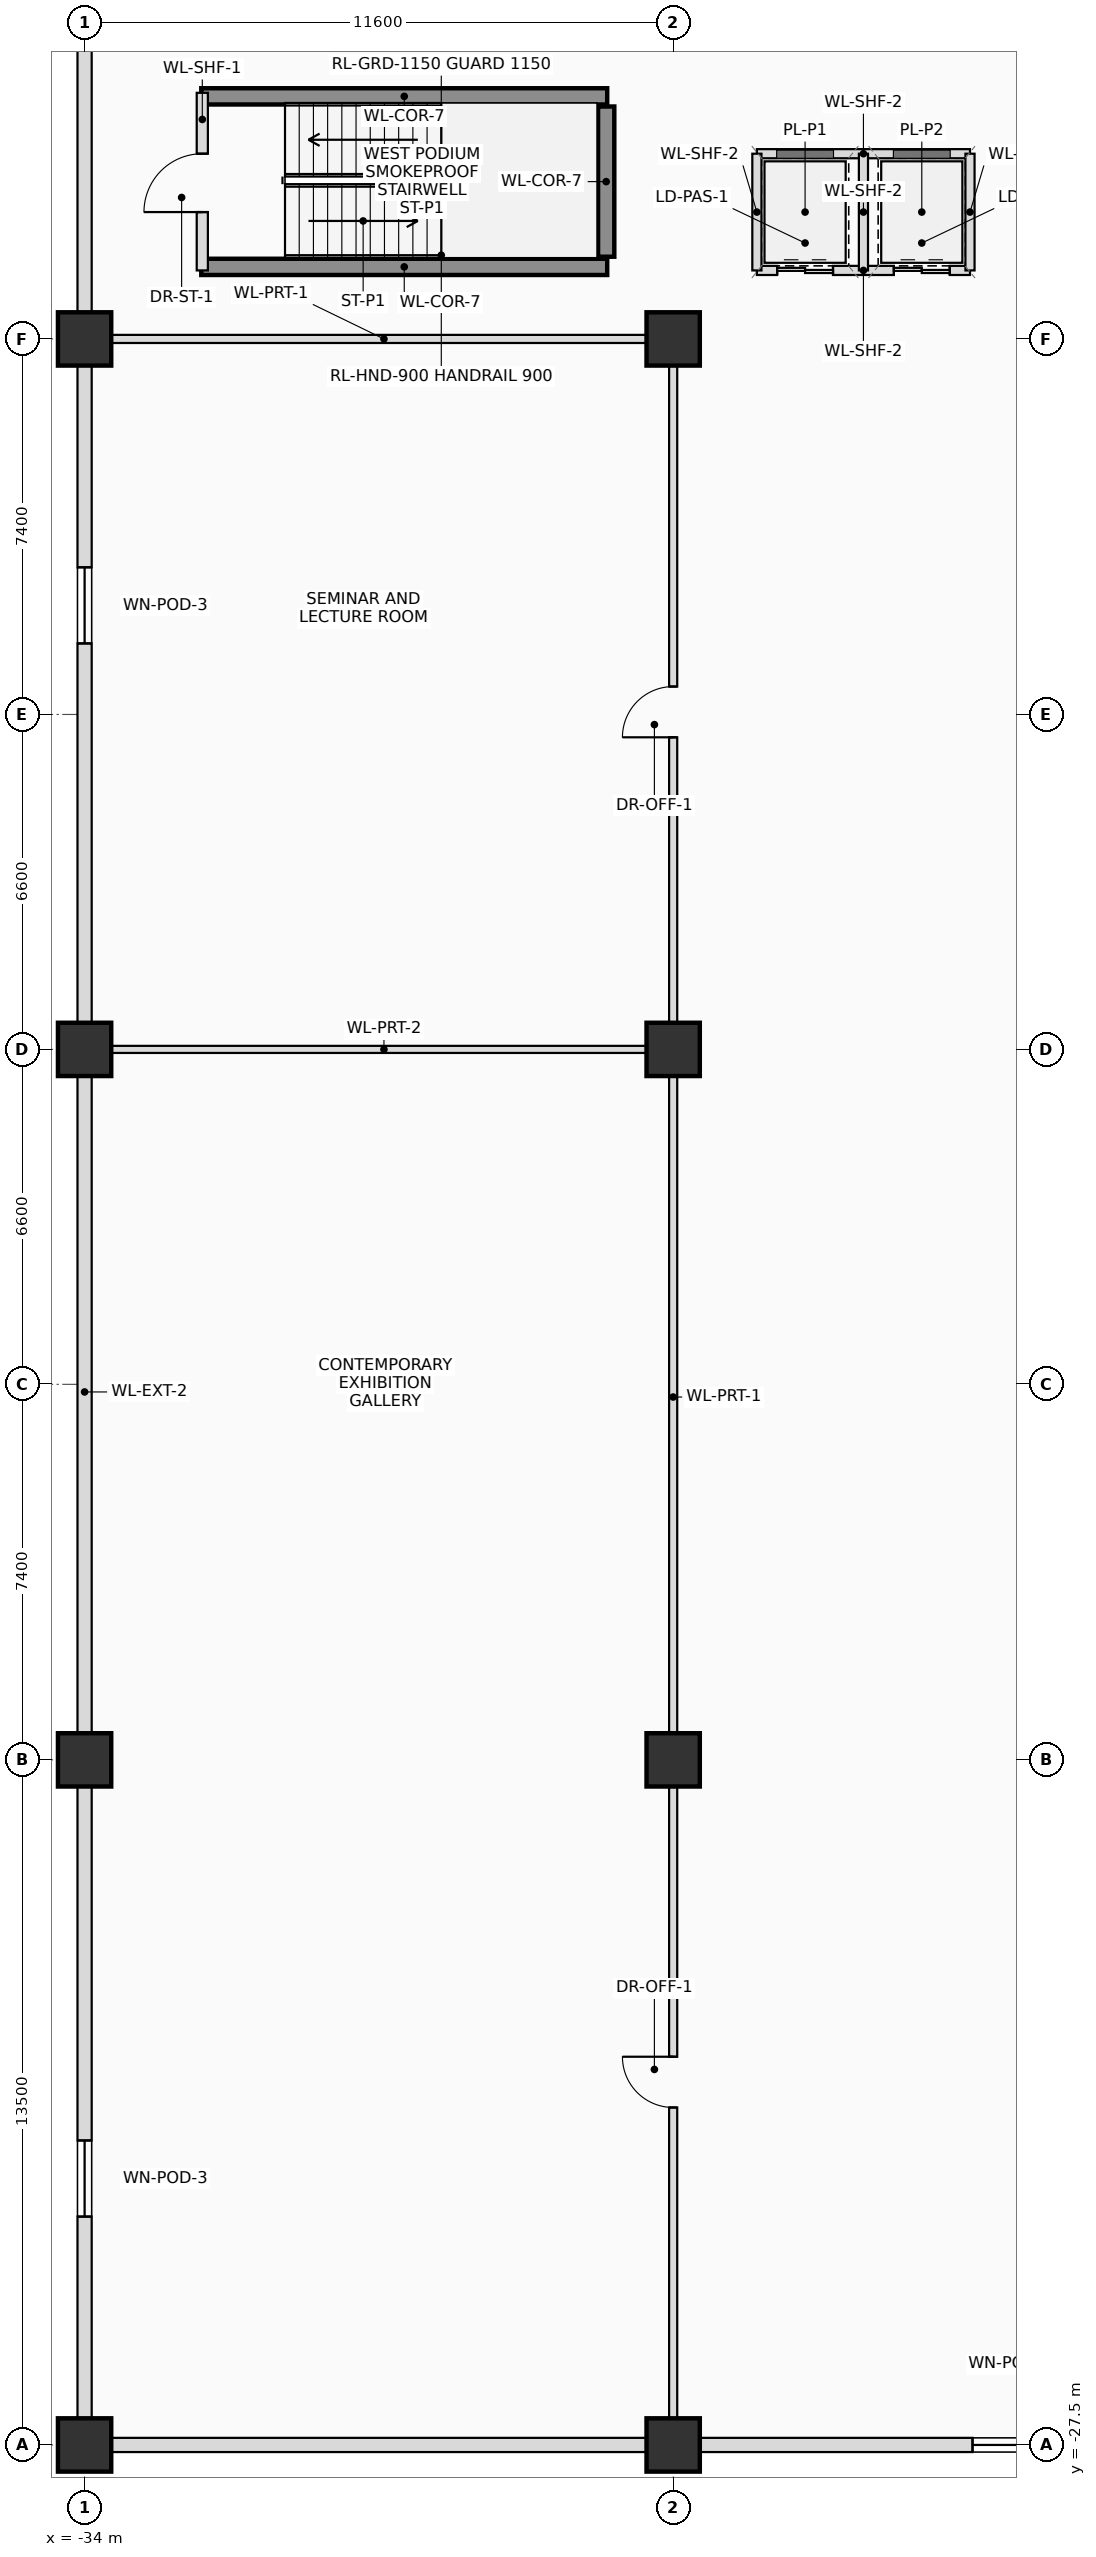
"""IFC4 building model, lengths in metres.
Left out: names, types, materials, properties, quantities, classifications, styles, units other than length and angle.
Written with IfcOpenShell. Run it as: python <this file> out.ifc"""

import sys

from ifc_helpers import new_model, si_unit, direction, frame, frame_2d, origin, origin_2d, place, context, subcontext, project, spatial, rectangle, extrude, source, transform, mapped, element, fill, save


model = new_model("IFC4")
c1 = context("Model", 3, precision=1e-05, world=origin(), true_north=direction((0.0, 1.0)))
c2 = subcontext(c1, "Body", "Model", "MODEL_VIEW")
j1 = project(units=[si_unit("LENGTHUNIT", "METRE"), si_unit("PLANEANGLEUNIT", "RADIAN")], contexts=[c1])
p1 = place(None, origin())
s1 = spatial("IfcSite", under=j1, at=p1, CompositionType="ELEMENT")
p2 = place(p1, origin())
s2 = spatial("IfcBuilding", under=s1, at=p2, CompositionType="ELEMENT")
p3 = place(p2, frame((0.0, 0.0, 8.4)))
s3 = spatial("IfcBuildingStorey", under=s2, at=p3, CompositionType="ELEMENT", Elevation=8.4)
for number, where, z_axis, x_axis in (
    (1, (-31.7, 18.78, 0.0), (0.0, 0.0, 1.0), (1.0, 0.0, 0.0)),
    (2, (-31.7, 15.42, 0.0), (0.0, 0.0, 1.0), (1.0, 0.0, 0.0)),
):
    element("IfcWall", number, at=place(p3, frame(where, z_axis=z_axis, x_axis=x_axis)), inside=s3, PredefinedType="SHEAR", context=c2, shape_type="SweptSolid", body=[
        extrude(rectangle(XDim=8.0, YDim=0.32, at=frame_2d((4.0, 0.0))), origin(), (0.0, 0.0, 1.0), 3.9),
    ])
p4 = place(p3, frame((-23.72, 15.62, 0.0), z_axis=(0.0, 0.0, 1.0), x_axis=(0.0, 1.0, 0.0)))
e3 = element("IfcWall", 3, at=p4, inside=s3, PredefinedType="SHEAR", context=c2, shape_type="SweptSolid", body=[
    extrude(rectangle(XDim=2.96, YDim=0.32, at=frame_2d((1.48, 0.0))), origin(), (0.0, 0.0, 1.0), 3.9),
])
m1 = source(origin(), c2, "Body", "SweptSolid", [
    extrude(rectangle(XDim=1.05, YDim=1.05, at=origin_2d()), origin(), (0.0, 0.0, 1.0), 3.9),
])
for number, where, z_axis, x_axis in (
    (4, (-34.0, -27.5, 0.0), (0.0, 0.0, 1.0), (1.0, 0.0, 0.0)),
    (5, (-22.4, -27.5, 0.0), (0.0, 0.0, 1.0), (1.0, 0.0, 0.0)),
    (6, (-34.0, -14.0, 0.0), (0.0, 0.0, 1.0), (1.0, 0.0, 0.0)),
    (7, (-22.4, -14.0, 0.0), (0.0, 0.0, 1.0), (1.0, 0.0, 0.0)),
    (8, (-34.0, 0.0, 0.0), (0.0, 0.0, 1.0), (1.0, 0.0, 0.0)),
    (9, (-22.4, 0.0, 0.0), (0.0, 0.0, 1.0), (1.0, 0.0, 0.0)),
    (10, (-34.0, 14.0, 0.0), (0.0, 0.0, 1.0), (1.0, 0.0, 0.0)),
    (11, (-22.4, 14.0, 0.0), (0.0, 0.0, 1.0), (1.0, 0.0, 0.0)),
):
    element("IfcColumn", number, at=place(p3, frame(where, z_axis=z_axis, x_axis=x_axis)), inside=s3, PredefinedType="COLUMN", context=c2, shape_type="MappedRepresentation", body=[
        mapped(m1, transform((0.0, 0.0, 0.0), scale=1.0)),
    ])
p5 = place(p3, frame((34.0, -27.5, 0.0), z_axis=(0.0, 0.0, 1.0), x_axis=(-1.0, 0.0, 0.0)))
e12 = element("IfcWall", 12, at=p5, inside=s3, PredefinedType="SOLIDWALL", context=c2, shape_type="SweptSolid", body=[
    extrude(rectangle(XDim=68.0, YDim=0.28, at=frame_2d((34.0, 0.0))), origin(), (0.0, 0.0, 1.0), 2.65),
])
p6 = place(p5, frame((16.0, 0.0, 0.65)))
e13 = element("IfcOpeningElement", 13, at=p6, cuts=e12, PredefinedType="OPENING", context=c2, shape_type="SweptSolid", body=[
    extrude(rectangle(XDim=1.5, YDim=1.8, at=frame_2d((0.75, 0.9))), frame((0.0, 0.15, 0.0), z_axis=(0.0, -1.0, 0.0), x_axis=(1.0, 0.0, 0.0)), (0.0, 0.0, 1.0), 0.3),
])
p7 = place(p5, frame((49.0, 0.0, 0.65)))
e14 = element("IfcOpeningElement", 14, at=p7, cuts=e12, PredefinedType="OPENING", context=c2, shape_type="SweptSolid", body=[
    extrude(rectangle(XDim=1.5, YDim=1.8, at=frame_2d((0.75, 0.9))), frame((0.0, 0.15, 0.0), z_axis=(0.0, -1.0, 0.0), x_axis=(1.0, 0.0, 0.0)), (0.0, 0.0, 1.0), 0.3),
])
p8 = place(p3, frame((-34.0, -27.5, 0.0), z_axis=(0.0, 0.0, 1.0), x_axis=(0.0, 1.0, 0.0)))
e15 = element("IfcWall", 15, at=p8, inside=s3, PredefinedType="SOLIDWALL", context=c2, shape_type="SweptSolid", body=[
    extrude(rectangle(XDim=57.0, YDim=0.28, at=frame_2d((28.5, 0.0))), origin(), (0.0, 0.0, 1.0), 2.65),
])
p9 = place(p8, frame((4.5, 0.0, 0.65)))
e16 = element("IfcOpeningElement", 16, at=p9, cuts=e15, PredefinedType="OPENING", context=c2, shape_type="SweptSolid", body=[
    extrude(rectangle(XDim=1.5, YDim=1.8, at=frame_2d((0.75, 0.9))), frame((0.0, 0.15, 0.0), z_axis=(0.0, -1.0, 0.0), x_axis=(1.0, 0.0, 0.0)), (0.0, 0.0, 1.0), 0.3),
])
p10 = place(p8, frame((35.5, 0.0, 0.65)))
e17 = element("IfcOpeningElement", 17, at=p10, cuts=e15, PredefinedType="OPENING", context=c2, shape_type="SweptSolid", body=[
    extrude(rectangle(XDim=1.5, YDim=1.8, at=frame_2d((0.75, 0.9))), frame((0.0, 0.15, 0.0), z_axis=(0.0, -1.0, 0.0), x_axis=(1.0, 0.0, 0.0)), (0.0, 0.0, 1.0), 0.3),
])
p11 = place(p3, frame((-31.68, 15.35, 0.0), z_axis=(0.0, 0.0, 1.0), x_axis=(0.0, 1.0, 0.0)))
e18 = element("IfcWall", 18, at=p11, inside=s3, PredefinedType="PLUMBINGWALL", context=c2, shape_type="SweptSolid", body=[
    extrude(rectangle(XDim=3.5, YDim=0.22, at=frame_2d((1.75, 0.0))), origin(), (0.0, 0.0, 1.0), 3.3),
])
p12 = place(p11, frame((1.15, 0.0, 0.0)))
e19 = element("IfcOpeningElement", 19, at=p12, cuts=e18, PredefinedType="OPENING", context=c2, shape_type="SweptSolid", body=[
    extrude(rectangle(XDim=1.15, YDim=2.15, at=frame_2d((0.575, 1.075))), frame((0.0, 0.12, 0.0), z_axis=(0.0, -1.0, 0.0), x_axis=(1.0, 0.0, 0.0)), (0.0, 0.0, 1.0), 0.24),
])
p13 = place(p3, frame((-20.75, 15.35, 0.0), z_axis=(0.0, 0.0, 1.0), x_axis=(1.0, 0.0, 0.0)))
e20 = element("IfcWall", 20, at=p13, inside=s3, PredefinedType="PLUMBINGWALL", context=c2, shape_type="SweptSolid", body=[
    extrude(rectangle(XDim=4.2, YDim=0.18, at=frame_2d((2.1, 0.0))), origin(), (0.0, 0.0, 1.0), 3.57),
])
p14 = place(p13, frame((0.4, 0.0, 0.0)))
e21 = element("IfcOpeningElement", 21, at=p14, cuts=e20, PredefinedType="OPENING", context=c2, shape_type="SweptSolid", body=[
    extrude(rectangle(XDim=1.1, YDim=2.2, at=frame_2d((0.55, 1.1))), frame((0.0, 0.1, 0.0), z_axis=(0.0, -1.0, 0.0), x_axis=(1.0, 0.0, 0.0)), (0.0, 0.0, 1.0), 0.2),
])
p15 = place(p13, frame((2.7, 0.0, 0.0)))
e22 = element("IfcOpeningElement", 22, at=p15, cuts=e20, PredefinedType="OPENING", context=c2, shape_type="SweptSolid", body=[
    extrude(rectangle(XDim=1.1, YDim=2.2, at=frame_2d((0.55, 1.1))), frame((0.0, 0.1, 0.0), z_axis=(0.0, -1.0, 0.0), x_axis=(1.0, 0.0, 0.0)), (0.0, 0.0, 1.0), 0.2),
])
p16 = place(p3, frame((-20.75, 17.65, 0.0), z_axis=(0.0, 0.0, 1.0), x_axis=(1.0, 0.0, 0.0)))
e23 = element("IfcWall", 23, at=p16, inside=s3, PredefinedType="PLUMBINGWALL", context=c2, shape_type="SweptSolid", body=[
    extrude(rectangle(XDim=4.2, YDim=0.18, at=frame_2d((2.1, 0.0))), origin(), (0.0, 0.0, 1.0), 3.57),
])
for number, where, z_axis, x_axis in (
    (24, (-20.75, 15.35, 0.0), (0.0, 0.0, 1.0), (0.0, 1.0, 0.0)),
    (25, (-18.65, 15.35, 0.0), (0.0, 0.0, 1.0), (0.0, 1.0, 0.0)),
    (26, (-16.55, 15.35, 0.0), (0.0, 0.0, 1.0), (0.0, 1.0, 0.0)),
):
    element("IfcWall", number, at=place(p3, frame(where, z_axis=z_axis, x_axis=x_axis)), inside=s3, PredefinedType="PLUMBINGWALL", context=c2, shape_type="SweptSolid", body=[
        extrude(rectangle(XDim=2.3, YDim=0.18, at=frame_2d((1.15, 0.0))), origin(), (0.0, 0.0, 1.0), 3.57),
    ])
p17 = place(p3, frame((-22.4, -27.35, 0.0), z_axis=(0.0, 0.0, 1.0), x_axis=(0.0, 1.0, 0.0)))
e27 = element("IfcWall", 27, at=p17, inside=s3, PredefinedType="PARTITIONING", context=c2, shape_type="SweptSolid", body=[
    extrude(rectangle(XDim=41.35, YDim=0.16, at=frame_2d((20.675, 0.0))), origin(), (0.0, 0.0, 1.0), 2.775),
])
p18 = place(p17, frame((6.5, 0.0, 0.0)))
e28 = element("IfcOpeningElement", 28, at=p18, cuts=e27, PredefinedType="OPENING", context=c2, shape_type="SweptSolid", body=[
    extrude(rectangle(XDim=1.0, YDim=2.25, at=frame_2d((0.5, 1.125))), frame((0.0, 0.09, 0.0), z_axis=(0.0, -1.0, 0.0), x_axis=(1.0, 0.0, 0.0)), (0.0, 0.0, 1.0), 0.18),
])
p19 = place(p17, frame((33.5, 0.0, 0.0)))
e29 = element("IfcOpeningElement", 29, at=p19, cuts=e27, PredefinedType="OPENING", context=c2, shape_type="SweptSolid", body=[
    extrude(rectangle(XDim=1.0, YDim=2.25, at=frame_2d((0.5, 1.125))), frame((0.0, 0.09, 0.0), z_axis=(0.0, -1.0, 0.0), x_axis=(1.0, 0.0, 0.0)), (0.0, 0.0, 1.0), 0.18),
])
p20 = place(p3, frame((-33.8, 14.0, 0.0), z_axis=(0.0, 0.0, 1.0), x_axis=(1.0, 0.0, 0.0)))
e30 = element("IfcWall", 30, at=p20, inside=s3, PredefinedType="PARTITIONING", context=c2, shape_type="SweptSolid", body=[
    extrude(rectangle(XDim=11.4, YDim=0.16, at=frame_2d((5.7, 0.0))), origin(), (0.0, 0.0, 1.0), 2.775),
])
p21 = place(p3, frame((-33.8, 0.0, 0.0), z_axis=(0.0, 0.0, 1.0), x_axis=(1.0, 0.0, 0.0)))
e31 = element("IfcWall", 31, at=p21, inside=s3, PredefinedType="PARTITIONING", context=c2, shape_type="SweptSolid", body=[
    extrude(rectangle(XDim=11.4, YDim=0.14, at=frame_2d((5.7, 0.0))), origin(), (0.0, 0.0, 1.0), 2.775),
])
p22 = place(p7, origin())
e32 = element("IfcWindow", 32, at=p22, inside=s3, PartitioningType="SINGLE_PANEL", PredefinedType="WINDOW", context=c2, shape_type="SweptSolid", body=[
    extrude(rectangle(XDim=1.5, YDim=1.8, at=frame_2d((0.75, 0.9))), frame((0.0, 0.03, 0.0), z_axis=(0.0, -1.0, 0.0), x_axis=(1.0, 0.0, 0.0)), (0.0, 0.0, 1.0), 0.06),
])
fill(e14, e32)
p23 = place(p9, origin())
e33 = element("IfcWindow", 33, at=p23, inside=s3, PartitioningType="SINGLE_PANEL", PredefinedType="WINDOW", context=c2, shape_type="SweptSolid", body=[
    extrude(rectangle(XDim=1.5, YDim=1.8, at=frame_2d((0.75, 0.9))), frame((0.0, 0.03, 0.0), z_axis=(0.0, -1.0, 0.0), x_axis=(1.0, 0.0, 0.0)), (0.0, 0.0, 1.0), 0.06),
])
fill(e16, e33)
p24 = place(p10, origin())
e34 = element("IfcWindow", 34, at=p24, inside=s3, PartitioningType="SINGLE_PANEL", PredefinedType="WINDOW", context=c2, shape_type="SweptSolid", body=[
    extrude(rectangle(XDim=1.5, YDim=1.8, at=frame_2d((0.75, 0.9))), frame((0.0, 0.03, 0.0), z_axis=(0.0, -1.0, 0.0), x_axis=(1.0, 0.0, 0.0)), (0.0, 0.0, 1.0), 0.06),
])
fill(e17, e34)
p25 = place(p12, origin())
e35 = element("IfcDoor", 35, at=p25, inside=s3, OperationType="SINGLE_SWING_LEFT", PredefinedType="DOOR", context=c2, shape_type="SweptSolid", body=[
    extrude(rectangle(XDim=1.15, YDim=2.15, at=frame_2d((0.575, 1.075))), frame((0.0, 0.025, 0.0), z_axis=(0.0, -1.0, 0.0), x_axis=(1.0, 0.0, 0.0)), (0.0, 0.0, 1.0), 0.05),
])
fill(e19, e35)
p26 = place(p14, origin())
e36 = element("IfcDoor", 36, at=p26, inside=s3, OperationType="DOUBLE_DOOR_SLIDING", PredefinedType="DOOR", context=c2, shape_type="SweptSolid", body=[
    extrude(rectangle(XDim=1.1, YDim=2.2, at=frame_2d((0.55, 1.1))), frame((0.0, 0.025, 0.0), z_axis=(0.0, -1.0, 0.0), x_axis=(1.0, 0.0, 0.0)), (0.0, 0.0, 1.0), 0.05),
])
fill(e21, e36)
p27 = place(p15, origin())
e37 = element("IfcDoor", 37, at=p27, inside=s3, OperationType="DOUBLE_DOOR_SLIDING", PredefinedType="DOOR", context=c2, shape_type="SweptSolid", body=[
    extrude(rectangle(XDim=1.1, YDim=2.2, at=frame_2d((0.55, 1.1))), frame((0.0, 0.025, 0.0), z_axis=(0.0, -1.0, 0.0), x_axis=(1.0, 0.0, 0.0)), (0.0, 0.0, 1.0), 0.05),
])
fill(e22, e37)
p28 = place(p18, origin())
e38 = element("IfcDoor", 38, at=p28, inside=s3, OperationType="SINGLE_SWING_RIGHT", PredefinedType="DOOR", context=c2, shape_type="SweptSolid", body=[
    extrude(rectangle(XDim=1.0, YDim=2.25, at=frame_2d((0.5, 1.125))), frame((0.0, 0.025, 0.0), z_axis=(0.0, -1.0, 0.0), x_axis=(1.0, 0.0, 0.0)), (0.0, 0.0, 1.0), 0.05),
])
fill(e28, e38)
p29 = place(p19, origin())
e39 = element("IfcDoor", 39, at=p29, inside=s3, OperationType="SINGLE_SWING_LEFT", PredefinedType="DOOR", context=c2, shape_type="SweptSolid", body=[
    extrude(rectangle(XDim=1.0, YDim=2.25, at=frame_2d((0.5, 1.125))), frame((0.0, 0.025, 0.0), z_axis=(0.0, -1.0, 0.0), x_axis=(1.0, 0.0, 0.0)), (0.0, 0.0, 1.0), 0.05),
])
fill(e29, e39)
save(model, sys.argv[1])
